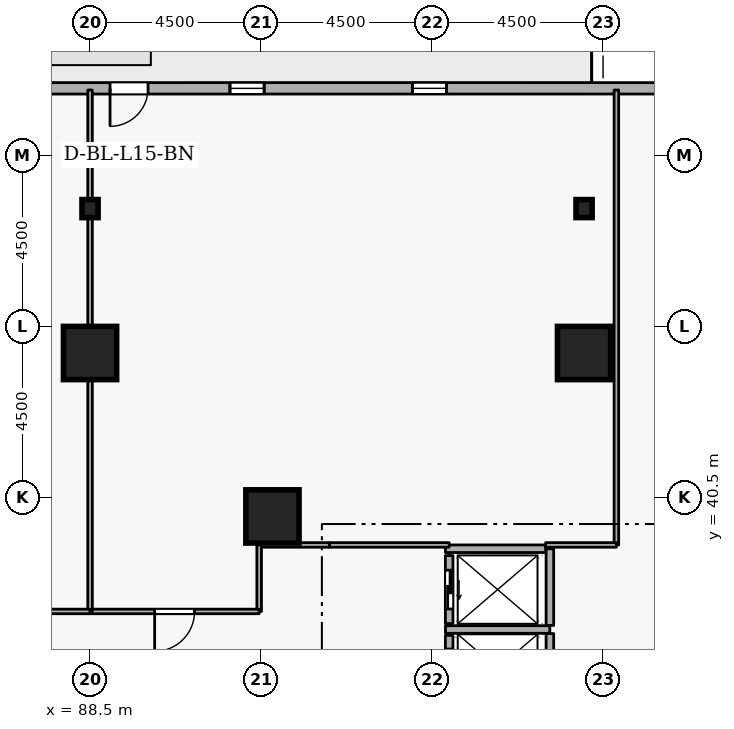
"""IFC4 building model, lengths in metres.
Left out: names, types, materials, properties, quantities, classifications, styles, units other than length and angle.
Written with IfcOpenShell. Run it as: python <this file> out.ifc"""

import sys

from ifc_helpers import new_model, si_unit, direction, frame, frame_2d, origin, origin_2d, place, context, subcontext, project, spatial, rectangle, i_section, extrude, element, fill, save


model = new_model("IFC4")
c1 = context("Model", 3, precision=1e-05, world=origin(), true_north=direction((0.0, 1.0)))
c2 = subcontext(c1, "Body", "Model", "MODEL_VIEW")
j1 = project(units=[si_unit("LENGTHUNIT", "METRE"), si_unit("PLANEANGLEUNIT", "RADIAN")], contexts=[c1])
p1 = place(None, origin())
s1 = spatial("IfcSite", under=j1, at=p1, CompositionType="ELEMENT")
p2 = place(p1, origin())
s2 = spatial("IfcBuilding", under=s1, at=p2, CompositionType="ELEMENT")
p3 = place(p2, frame((0.0, 0.0, 60.9)))
s3 = spatial("IfcBuildingStorey", under=s2, at=p3, CompositionType="ELEMENT", Elevation=60.9)
for number, where, z_axis, x_axis in (
    (1, (101.5, 44.3, 0.0), (0.0, 0.0, 1.0), (1.0, 0.0, 0.0)),
    (2, (88.5, 44.3, 0.0), (0.0, 0.0, 1.0), (1.0, 0.0, 0.0)),
    (3, (93.3, 40.0, 0.0), (0.0, 0.0, 1.0), (1.0, 0.0, 0.0)),
):
    element("IfcColumn", number, at=place(p3, frame(where, z_axis=z_axis, x_axis=x_axis)), inside=s3, PredefinedType="COLUMN", context=c2, shape_type="SweptSolid", body=[
        extrude(rectangle(XDim=1.4, YDim=1.4, at=origin_2d()), origin(), (0.0, 0.0, 1.0), 3.6),
    ])
for number, where, z_axis, x_axis in (
    (4, (101.5, 48.1, 0.0), (0.0, 0.0, 1.0), (1.0, 0.0, 0.0)),
    (5, (88.5, 48.1, 0.0), (0.0, 0.0, 1.0), (1.0, 0.0, 0.0)),
):
    element("IfcColumn", number, at=place(p3, frame(where, z_axis=z_axis, x_axis=x_axis)), inside=s3, PredefinedType="COLUMN", context=c2, shape_type="SweptSolid", body=[
        extrude(i_section(OverallWidth=0.424, OverallDepth=0.475, WebThickness=0.048, FlangeThickness=0.077, FilletRadius=0.015, at=origin_2d()), origin(), (0.0, 0.0, 1.0), 3.6),
    ])
p4 = place(p3, frame((110.181, 51.265, 0.0), z_axis=(0.0, 0.0, 1.0), x_axis=(-0.999999998209, -5.985515e-05, 0.0)))
e6 = element("IfcWall", 6, at=p4, inside=s3, PredefinedType="STANDARD", context=c2, shape_type="SweptSolid", body=[
    extrude(rectangle(XDim=36.71, YDim=0.3, at=frame_2d((18.355, 0.0))), origin(), (0.0, 0.0, 1.0), 2.7),
])
p5 = place(p4, frame((20.155, 0.0, 0.0)))
e7 = element("IfcOpeningElement", 7, at=p5, cuts=e6, PredefinedType="OPENING", context=c2, shape_type="SweptSolid", body=[
    extrude(rectangle(XDim=1.0, YDim=2.08, at=frame_2d((0.5, 1.04))), frame((0.0, 0.16, 0.0), z_axis=(0.0, -1.0, 0.0), x_axis=(1.0, 0.0, 0.0)), (0.0, 0.0, 1.0), 0.32),
])
p6 = place(p4, frame((2.7, 0.0, 0.72)))
e8 = element("IfcOpeningElement", 8, at=p6, cuts=e6, PredefinedType="OPENING", context=c2, shape_type="SweptSolid", body=[
    extrude(rectangle(XDim=0.9, YDim=1.75, at=frame_2d((0.45, 0.875))), frame((0.0, 0.16, 0.0), z_axis=(0.0, -1.0, 0.0), x_axis=(1.0, 0.0, 0.0)), (0.0, 0.0, 1.0), 0.32),
])
p7 = place(p4, frame((12.3, 0.0, 0.72)))
e9 = element("IfcOpeningElement", 9, at=p7, cuts=e6, PredefinedType="OPENING", context=c2, shape_type="SweptSolid", body=[
    extrude(rectangle(XDim=0.9, YDim=1.75, at=frame_2d((0.45, 0.875))), frame((0.0, 0.16, 0.0), z_axis=(0.0, -1.0, 0.0), x_axis=(1.0, 0.0, 0.0)), (0.0, 0.0, 1.0), 0.32),
])
p8 = place(p4, frame((17.1, 0.0, 0.72)))
e10 = element("IfcOpeningElement", 10, at=p8, cuts=e6, PredefinedType="OPENING", context=c2, shape_type="SweptSolid", body=[
    extrude(rectangle(XDim=0.9, YDim=1.75, at=frame_2d((0.45, 0.875))), frame((0.0, 0.16, 0.0), z_axis=(0.0, -1.0, 0.0), x_axis=(1.0, 0.0, 0.0)), (0.0, 0.0, 1.0), 0.32),
])
p9 = place(p4, frame((26.7, 0.0, 0.72)))
e11 = element("IfcOpeningElement", 11, at=p9, cuts=e6, PredefinedType="OPENING", context=c2, shape_type="SweptSolid", body=[
    extrude(rectangle(XDim=0.9, YDim=1.75, at=frame_2d((0.45, 0.875))), frame((0.0, 0.16, 0.0), z_axis=(0.0, -1.0, 0.0), x_axis=(1.0, 0.0, 0.0)), (0.0, 0.0, 1.0), 0.32),
])
p10 = place(p4, frame((31.5, 0.0, 0.72)))
e12 = element("IfcOpeningElement", 12, at=p10, cuts=e6, PredefinedType="OPENING", context=c2, shape_type="SweptSolid", body=[
    extrude(rectangle(XDim=0.9, YDim=1.75, at=frame_2d((0.45, 0.875))), frame((0.0, 0.16, 0.0), z_axis=(0.0, -1.0, 0.0), x_axis=(1.0, 0.0, 0.0)), (0.0, 0.0, 1.0), 0.32),
])
p11 = place(p3, frame((97.95, 36.87, 0.0), z_axis=(0.0, 0.0, 1.0), x_axis=(0.0, -1.0, 0.0)))
e13 = element("IfcWall", 13, at=p11, inside=s3, PredefinedType="STANDARD", context=c2, shape_type="SweptSolid", body=[
    extrude(rectangle(XDim=1.74, YDim=0.2, at=frame_2d((0.87, 0.0))), origin(), (0.0, 0.0, 1.0), 3.34),
])
p12 = place(p11, frame((0.36, 0.0, 0.0)))
e14 = element("IfcOpeningElement", 14, at=p12, cuts=e13, PredefinedType="OPENING", context=c2, shape_type="SweptSolid", body=[
    extrude(rectangle(XDim=1.02, YDim=2.06, at=frame_2d((0.51, 1.03))), frame((0.0, 0.11, 0.0), z_axis=(0.0, -1.0, 0.0), x_axis=(1.0, 0.0, 0.0)), (0.0, 0.0, 1.0), 0.22),
])
p13 = place(p3, frame((97.95, 38.97, 0.0), z_axis=(0.0, 0.0, 1.0), x_axis=(0.0, -1.0, 0.0)))
e15 = element("IfcWall", 15, at=p13, inside=s3, PredefinedType="STANDARD", context=c2, shape_type="SweptSolid", body=[
    extrude(rectangle(XDim=1.79, YDim=0.2, at=frame_2d((0.895, 0.0))), origin(), (0.0, 0.0, 1.0), 3.34),
])
p14 = place(p13, frame((0.385, 0.0, 0.0)))
e16 = element("IfcOpeningElement", 16, at=p14, cuts=e15, PredefinedType="OPENING", context=c2, shape_type="SweptSolid", body=[
    extrude(rectangle(XDim=1.02, YDim=2.06, at=frame_2d((0.51, 1.03))), frame((0.0, 0.11, 0.0), z_axis=(0.0, -1.0, 0.0), x_axis=(1.0, 0.0, 0.0)), (0.0, 0.0, 1.0), 0.22),
])
p15 = place(p3, frame((97.852, 37.025, 0.0), z_axis=(0.0, 0.0, 1.0), x_axis=(1.0, 0.0, 0.0)))
e17 = element("IfcWall", 17, at=p15, inside=s3, PredefinedType="STANDARD", context=c2, shape_type="SweptSolid", body=[
    extrude(rectangle(XDim=2.746, YDim=0.2, at=frame_2d((1.373, 0.0))), origin(), (0.0, 0.0, 1.0), 3.34),
])
p16 = place(p3, frame((100.6, 35.062, 0.0), z_axis=(0.0, 0.0, 1.0), x_axis=(0.0, 1.0, 0.0)))
e18 = element("IfcWall", 18, at=p16, inside=s3, PredefinedType="STANDARD", context=c2, shape_type="SweptSolid", body=[
    extrude(rectangle(XDim=1.856, YDim=0.2, at=frame_2d((0.928, 0.0))), origin(), (0.0, 0.0, 1.0), 3.34),
])
p17 = place(p3, frame((100.6, 37.132, 0.0), z_axis=(0.0, 0.0, 1.0), x_axis=(0.0, 1.0, 0.0)))
e19 = element("IfcWall", 19, at=p17, inside=s3, PredefinedType="STANDARD", context=c2, shape_type="SweptSolid", body=[
    extrude(rectangle(XDim=2.016, YDim=0.2, at=frame_2d((1.008, 0.0))), origin(), (0.0, 0.0, 1.0), 3.34),
])
p18 = place(p3, frame((97.852, 39.15, 0.0), z_axis=(0.0, 0.0, 1.0), x_axis=(1.0, 0.0, 0.0)))
e20 = element("IfcWall", 20, at=p18, inside=s3, PredefinedType="STANDARD", context=c2, shape_type="SweptSolid", body=[
    extrude(rectangle(XDim=2.636, YDim=0.2, at=frame_2d((1.318, 0.0))), origin(), (0.0, 0.0, 1.0), 3.34),
])
p19 = place(p3, frame((97.95, 39.25, 0.0), z_axis=(0.0, 0.0, 1.0), x_axis=(-1.0, 0.0, 0.0)))
e21 = element("IfcWall", 21, at=p19, inside=s3, PredefinedType="PARTITIONING", context=c2, shape_type="SweptSolid", body=[
    extrude(rectangle(XDim=3.15, YDim=0.12, at=frame_2d((1.575, 0.0))), origin(), (0.0, 0.0, 1.0), 3.34),
])
p20 = place(p3, frame((94.8, 39.25, 0.0), z_axis=(0.0, 0.0, 1.0), x_axis=(-1.0, 0.0, 0.0)))
e22 = element("IfcWall", 22, at=p20, inside=s3, PredefinedType="PARTITIONING", context=c2, shape_type="SweptSolid", body=[
    extrude(rectangle(XDim=1.85, YDim=0.12, at=frame_2d((0.925, 0.0))), origin(), (0.0, 0.0, 1.0), 3.34),
])
p21 = place(p3, frame((92.95, 39.25, 0.0), z_axis=(0.0, 0.0, 1.0), x_axis=(0.0, -1.0, 0.0)))
e23 = element("IfcWall", 23, at=p21, inside=s3, PredefinedType="PARTITIONING", context=c2, shape_type="SweptSolid", body=[
    extrude(rectangle(XDim=1.75, YDim=0.12, at=frame_2d((0.875, 0.0))), origin(), (0.0, 0.0, 1.0), 3.34),
])
p22 = place(p3, frame((92.95, 37.5, 0.0), z_axis=(0.0, 0.0, 1.0), x_axis=(-1.0, 0.0, 0.0)))
e24 = element("IfcWall", 24, at=p22, inside=s3, PredefinedType="PARTITIONING", context=c2, shape_type="SweptSolid", body=[
    extrude(rectangle(XDim=4.45, YDim=0.12, at=frame_2d((2.225, 0.0))), origin(), (0.0, 0.0, 1.0), 3.34),
])
p23 = place(p22, frame((1.7, 0.0, 0.0)))
e25 = element("IfcOpeningElement", 25, at=p23, cuts=e24, PredefinedType="OPENING", context=c2, shape_type="SweptSolid", body=[
    extrude(rectangle(XDim=1.05, YDim=2.1, at=frame_2d((0.525, 1.05))), frame((0.0, 0.07, 0.0), z_axis=(0.0, -1.0, 0.0), x_axis=(1.0, 0.0, 0.0)), (0.0, 0.0, 1.0), 0.14),
])
p24 = place(p3, frame((88.5, 37.5, 0.0), z_axis=(0.0, 0.0, 1.0), x_axis=(0.0, 1.0, 0.0)))
e26 = element("IfcWall", 26, at=p24, inside=s3, PredefinedType="PARTITIONING", context=c2, shape_type="SweptSolid", body=[
    extrude(rectangle(XDim=13.72, YDim=0.12, at=frame_2d((6.86, 0.0))), origin(), (0.0, 0.0, 1.0), 2.878),
])
p25 = place(p3, frame((102.35, 51.22, 0.0), z_axis=(0.0, 0.0, 1.0), x_axis=(0.0, -1.0, 0.0)))
e27 = element("IfcWall", 27, at=p25, inside=s3, PredefinedType="PARTITIONING", context=c2, shape_type="SweptSolid", body=[
    extrude(rectangle(XDim=11.97, YDim=0.12, at=frame_2d((5.985, 0.0))), origin(), (0.0, 0.0, 1.0), 3.34),
])
p26 = place(p3, frame((102.35, 39.25, 0.0), z_axis=(0.0, 0.0, 1.0), x_axis=(-1.0, 0.0, 0.0)))
e28 = element("IfcWall", 28, at=p26, inside=s3, PredefinedType="PARTITIONING", context=c2, shape_type="SweptSolid", body=[
    extrude(rectangle(XDim=1.862, YDim=0.12, at=frame_2d((0.931, 0.0))), origin(), (0.0, 0.0, 1.0), 3.34),
])
p27 = place(p3, frame((88.5, 37.5, 0.0), z_axis=(0.0, 0.0, 1.0), x_axis=(-1.0, 0.0, 0.0)))
e29 = element("IfcWall", 29, at=p27, inside=s3, PredefinedType="PARTITIONING", context=c2, shape_type="SweptSolid", body=[
    extrude(rectangle(XDim=3.15, YDim=0.12, at=frame_2d((1.575, 0.0))), origin(), (0.0, 0.0, 1.0), 3.34),
])
p28 = place(p27, frame((1.1, 0.0, 0.0)))
e30 = element("IfcOpeningElement", 30, at=p28, cuts=e29, PredefinedType="OPENING", context=c2, shape_type="SweptSolid", body=[
    extrude(rectangle(XDim=0.95, YDim=2.1, at=frame_2d((0.475, 1.05))), frame((0.0, 0.07, 0.0), z_axis=(0.0, -1.0, 0.0), x_axis=(1.0, 0.0, 0.0)), (0.0, 0.0, 1.0), 0.14),
])
p29 = place(p5, origin())
e31 = element("IfcDoor", 31, at=p29, inside=s3, OperationType="SINGLE_SWING_RIGHT", PredefinedType="DOOR", context=c2, shape_type="SweptSolid", body=[
    extrude(rectangle(XDim=1.0, YDim=2.08, at=frame_2d((0.5, 1.04))), frame((0.0, 0.025, 0.0), z_axis=(0.0, -1.0, 0.0), x_axis=(1.0, 0.0, 0.0)), (0.0, 0.0, 1.0), 0.05),
])
fill(e7, e31)
p30 = place(p7, origin())
e32 = element("IfcWindow", 32, at=p30, inside=s3, PartitioningType="SINGLE_PANEL", PredefinedType="WINDOW", context=c2, shape_type="SweptSolid", body=[
    extrude(rectangle(XDim=0.9, YDim=1.75, at=frame_2d((0.45, 0.875))), frame((0.0, 0.03, 0.0), z_axis=(0.0, -1.0, 0.0), x_axis=(1.0, 0.0, 0.0)), (0.0, 0.0, 1.0), 0.06),
])
fill(e9, e32)
p31 = place(p8, origin())
e33 = element("IfcWindow", 33, at=p31, inside=s3, PartitioningType="SINGLE_PANEL", PredefinedType="WINDOW", context=c2, shape_type="SweptSolid", body=[
    extrude(rectangle(XDim=0.9, YDim=1.75, at=frame_2d((0.45, 0.875))), frame((0.0, 0.03, 0.0), z_axis=(0.0, -1.0, 0.0), x_axis=(1.0, 0.0, 0.0)), (0.0, 0.0, 1.0), 0.06),
])
fill(e10, e33)
p32 = place(p12, origin())
e34 = element("IfcDoor", 34, at=p32, inside=s3, OperationType="SLIDING_TO_LEFT", PredefinedType="DOOR", context=c2, shape_type="SweptSolid", body=[
    extrude(rectangle(XDim=1.02, YDim=2.06, at=frame_2d((0.51, 1.03))), frame((0.0, 0.025, 0.0), z_axis=(0.0, -1.0, 0.0), x_axis=(1.0, 0.0, 0.0)), (0.0, 0.0, 1.0), 0.05),
])
fill(e14, e34)
p33 = place(p14, origin())
e35 = element("IfcDoor", 35, at=p33, inside=s3, OperationType="SLIDING_TO_LEFT", PredefinedType="DOOR", context=c2, shape_type="SweptSolid", body=[
    extrude(rectangle(XDim=1.02, YDim=2.06, at=frame_2d((0.51, 1.03))), frame((0.0, 0.025, 0.0), z_axis=(0.0, -1.0, 0.0), x_axis=(1.0, 0.0, 0.0)), (0.0, 0.0, 1.0), 0.05),
])
fill(e16, e35)
p34 = place(p23, origin())
e36 = element("IfcDoor", 36, at=p34, inside=s3, OperationType="SINGLE_SWING_RIGHT", PredefinedType="DOOR", context=c2, shape_type="SweptSolid", body=[
    extrude(rectangle(XDim=1.05, YDim=2.1, at=frame_2d((0.525, 1.05))), frame((0.0, 0.025, 0.0), z_axis=(0.0, -1.0, 0.0), x_axis=(1.0, 0.0, 0.0)), (0.0, 0.0, 1.0), 0.05),
])
fill(e25, e36)
save(model, sys.argv[1])
